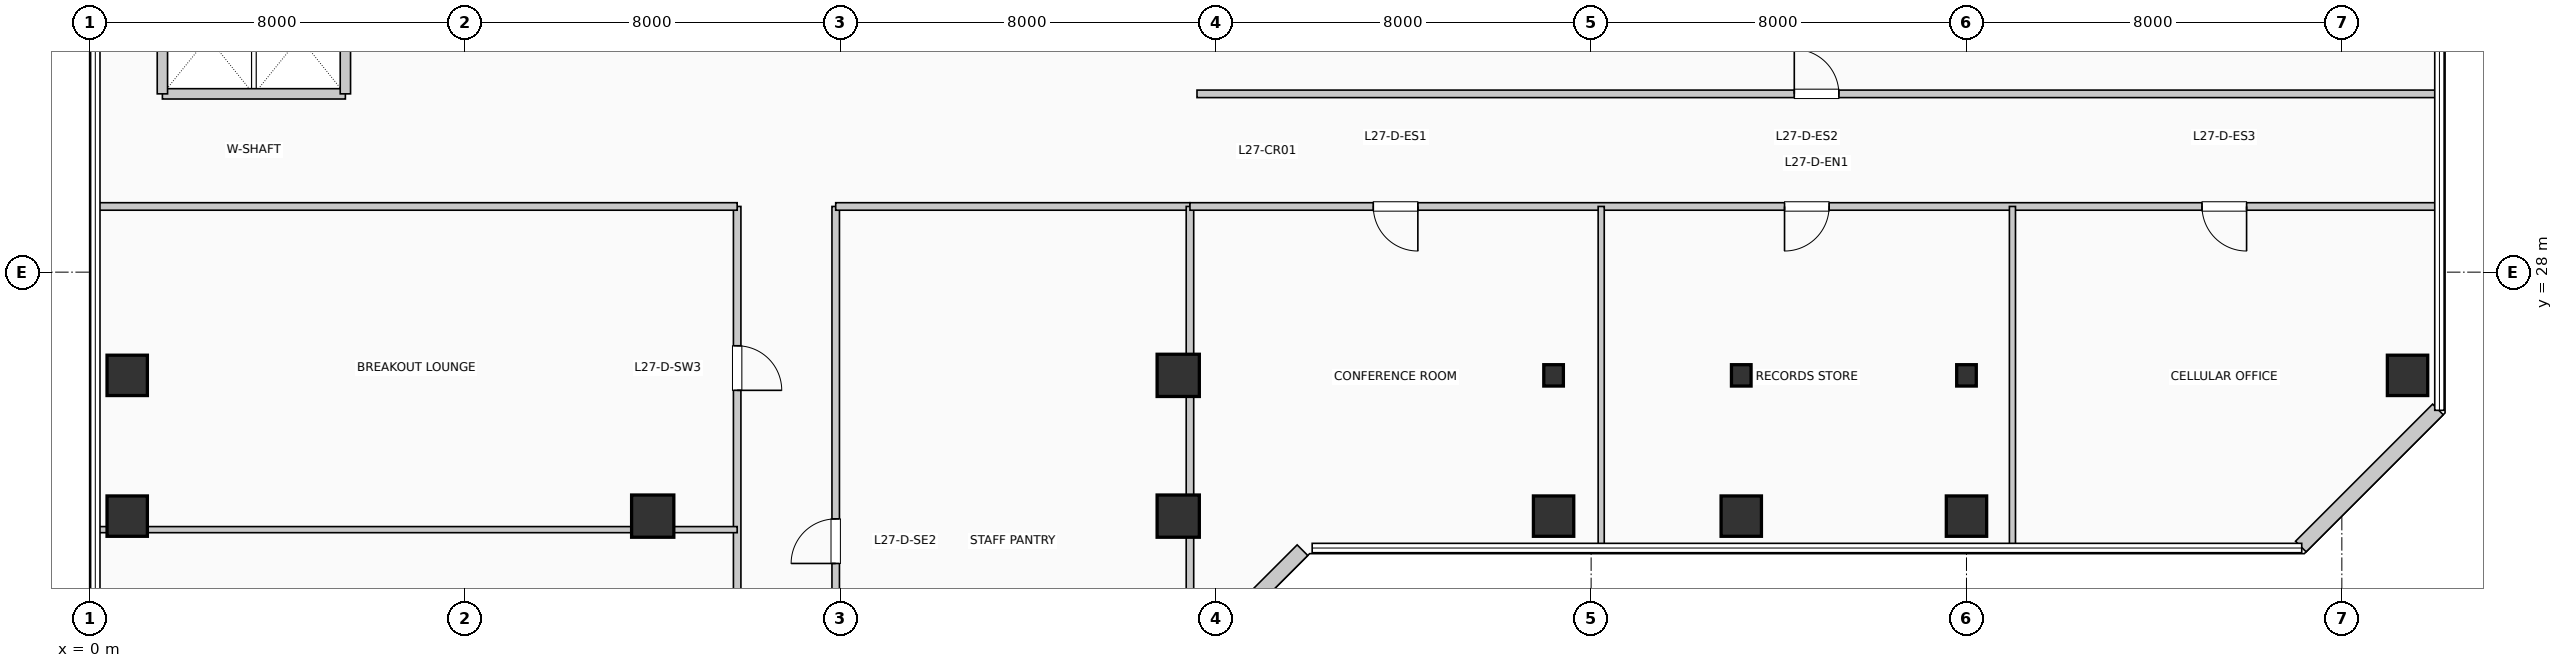
"""IFC4 building model, lengths in metres.
Left out: names, types, materials, properties, quantities, classifications, styles, units other than length and angle.
Written with IfcOpenShell. Run it as: python <this file> out.ifc"""

import sys

from ifc_helpers import new_model, si_unit, direction, frame, frame_2d, origin, origin_2d, place, context, subcontext, project, spatial, rectangle, i_section, extrude, element, fill, save


model = new_model("IFC4")
c1 = context("Model", 3, precision=1e-05, world=origin(), true_north=direction((0.0, 1.0)))
c2 = subcontext(c1, "Body", "Model", "MODEL_VIEW")
j1 = project(units=[si_unit("LENGTHUNIT", "METRE"), si_unit("PLANEANGLEUNIT", "RADIAN")], contexts=[c1])
p1 = place(None, origin())
s1 = spatial("IfcSite", under=j1, at=p1, CompositionType="ELEMENT")
p2 = place(p1, origin())
s2 = spatial("IfcBuilding", under=s1, at=p2, CompositionType="ELEMENT")
p3 = place(p2, frame((0.0, 0.0, 114.51)))
s3 = spatial("IfcBuildingStorey", under=s2, at=p3, CompositionType="ELEMENT", Elevation=114.51)
for number, where, z_axis, x_axis in (
    (1, (0.8, 22.8, 0.0), (0.0, 0.0, 1.0), (1.0, 0.0, 0.0)),
    (2, (0.8, 25.8, 0.0), (0.0, 0.0, 1.0), (1.0, 0.0, 0.0)),
):
    element("IfcColumn", number, at=place(p3, frame(where, z_axis=z_axis, x_axis=x_axis)), inside=s3, PredefinedType="COLUMN", context=c2, shape_type="SweptSolid", body=[
        extrude(rectangle(XDim=0.86, YDim=0.86, at=origin_2d()), origin(), (0.0, 0.0, 1.0), 3.96),
    ])
for number, where, z_axis, x_axis in (
    (3, (12.0, 22.8, 0.0), (0.0, 0.0, 1.0), (1.0, 0.0, 0.0)),
    (4, (23.2, 22.8, 0.0), (0.0, 0.0, 1.0), (1.0, 0.0, 0.0)),
    (5, (23.2, 25.8, 0.0), (0.0, 0.0, 1.0), (1.0, 0.0, 0.0)),
):
    element("IfcColumn", number, at=place(p3, frame(where, z_axis=z_axis, x_axis=x_axis)), inside=s3, PredefinedType="COLUMN", context=c2, shape_type="SweptSolid", body=[
        extrude(rectangle(XDim=0.9, YDim=0.9, at=origin_2d()), origin(), (0.0, 0.0, 1.0), 3.96),
    ])
p4 = place(p3, frame((31.2, 22.8, 0.0), z_axis=(0.0, 0.0, 1.0), x_axis=(1.0, 0.0, 0.0)))
e6 = element("IfcColumn", 6, at=p4, inside=s3, PredefinedType="COLUMN", context=c2, shape_type="SweptSolid", body=[
    extrude(rectangle(XDim=0.86, YDim=0.86, at=origin_2d()), origin(), (0.0, 0.0, 1.0), 3.96),
])
p5 = place(p3, frame((31.2, 25.8, 0.0), z_axis=(0.0, 0.0, 1.0), x_axis=(1.0, 0.0, 0.0)))
e7 = element("IfcColumn", 7, at=p5, inside=s3, PredefinedType="COLUMN", context=c2, shape_type="SweptSolid", body=[
    extrude(i_section(OverallWidth=0.418, OverallDepth=0.455, WebThickness=0.032, FlangeThickness=0.051, at=origin_2d()), origin(), (0.0, 0.0, 1.0), 3.96),
])
p6 = place(p3, frame((35.2, 22.8, 0.0), z_axis=(0.0, 0.0, 1.0), x_axis=(1.0, 0.0, 0.0)))
e8 = element("IfcColumn", 8, at=p6, inside=s3, PredefinedType="COLUMN", context=c2, shape_type="SweptSolid", body=[
    extrude(rectangle(XDim=0.86, YDim=0.86, at=origin_2d()), origin(), (0.0, 0.0, 1.0), 3.96),
])
p7 = place(p3, frame((35.2, 25.8, 0.0), z_axis=(0.0, 0.0, 1.0), x_axis=(1.0, 0.0, 0.0)))
e9 = element("IfcColumn", 9, at=p7, inside=s3, PredefinedType="COLUMN", context=c2, shape_type="SweptSolid", body=[
    extrude(i_section(OverallWidth=0.418, OverallDepth=0.455, WebThickness=0.032, FlangeThickness=0.051, at=origin_2d()), origin(), (0.0, 0.0, 1.0), 3.96),
])
p8 = place(p3, frame((40.0, 22.8, 0.0), z_axis=(0.0, 0.0, 1.0), x_axis=(1.0, 0.0, 0.0)))
e10 = element("IfcColumn", 10, at=p8, inside=s3, PredefinedType="COLUMN", context=c2, shape_type="SweptSolid", body=[
    extrude(rectangle(XDim=0.86, YDim=0.86, at=origin_2d()), origin(), (0.0, 0.0, 1.0), 3.96),
])
p9 = place(p3, frame((40.0, 25.8, 0.0), z_axis=(0.0, 0.0, 1.0), x_axis=(1.0, 0.0, 0.0)))
e11 = element("IfcColumn", 11, at=p9, inside=s3, PredefinedType="COLUMN", context=c2, shape_type="SweptSolid", body=[
    extrude(i_section(OverallWidth=0.418, OverallDepth=0.455, WebThickness=0.032, FlangeThickness=0.051, at=origin_2d()), origin(), (0.0, 0.0, 1.0), 3.96),
])
p10 = place(p3, frame((49.4, 25.8, 0.0), z_axis=(0.0, 0.0, 1.0), x_axis=(1.0, 0.0, 0.0)))
e12 = element("IfcColumn", 12, at=p10, inside=s3, PredefinedType="COLUMN", context=c2, shape_type="SweptSolid", body=[
    extrude(rectangle(XDim=0.86, YDim=0.86, at=origin_2d()), origin(), (0.0, 0.0, 1.0), 3.96),
])
p11 = place(p3, frame((23.926, 20.152, 0.0), z_axis=(0.0, 0.0, 1.0), x_axis=(0.707106781187, 0.707106781187, 0.0)))
e13 = element("IfcWall", 13, at=p11, inside=s3, PredefinedType="SOLIDWALL", context=c2, shape_type="SweptSolid", body=[
    extrude(rectangle(XDim=2.718, YDim=0.32, at=frame_2d((1.359, 0.0))), origin(), (0.0, 0.0, 1.0), 3.71),
])
p12 = place(p3, frame((47.126, 22.152, 0.0), z_axis=(0.0, 0.0, 1.0), x_axis=(0.707136318428, 0.707077242712, 0.0)))
e14 = element("IfcWall", 14, at=p12, inside=s3, PredefinedType="SOLIDWALL", context=c2, shape_type="SweptSolid", body=[
    extrude(rectangle(XDim=4.133, YDim=0.32, at=frame_2d((2.066, 0.0))), origin(), (0.0, 0.0, 1.0), 3.71),
])
p13 = place(p3, frame((1.55, 31.8, 0.0), z_axis=(0.0, 0.0, 1.0), x_axis=(1.0, 0.0, 0.0)))
e15 = element("IfcWall", 15, at=p13, inside=s3, PredefinedType="PARTITIONING", context=c2, shape_type="SweptSolid", body=[
    extrude(rectangle(XDim=3.9, YDim=0.22, at=frame_2d((1.95, 0.0))), origin(), (0.0, 0.0, 1.0), 3.71),
])
for number, where, z_axis, x_axis in (
    (16, (1.55, 31.8, 0.0), (0.0, 0.0, 1.0), (0.0, 1.0, 0.0)),
    (17, (5.45, 31.8, 0.0), (0.0, 0.0, 1.0), (0.0, 1.0, 0.0)),
):
    element("IfcWall", number, at=place(p3, frame(where, z_axis=z_axis, x_axis=x_axis)), inside=s3, PredefinedType="PARTITIONING", context=c2, shape_type="SweptSolid", body=[
        extrude(rectangle(XDim=2.38, YDim=0.22, at=frame_2d((1.19, 0.0))), origin(), (0.0, 0.0, 1.0), 3.71),
    ])
p14 = place(p3, frame((13.8, 4.8, 0.0), z_axis=(0.0, 0.0, 1.0), x_axis=(0.0, 1.0, 0.0)))
e18 = element("IfcWall", 18, at=p14, inside=s3, PredefinedType="PARTITIONING", context=c2, shape_type="SweptSolid", body=[
    extrude(rectangle(XDim=24.6, YDim=0.16, at=frame_2d((12.3, 0.0))), origin(), (0.0, 0.0, 1.0), 3.71),
])
p15 = place(p14, frame((5.149, 0.0, 0.0), z_axis=(0.0, 0.0, 1.0), x_axis=(-1.0, 0.0, 0.0)))
e19 = element("IfcOpeningElement", 19, at=p15, cuts=e18, PredefinedType="OPENING", context=c2, shape_type="SweptSolid", body=[
    extrude(rectangle(XDim=0.95, YDim=2.15, at=frame_2d((0.475, 1.075))), frame((0.0, 0.09, 0.0), z_axis=(0.0, -1.0, 0.0), x_axis=(1.0, 0.0, 0.0)), (0.0, 0.0, 1.0), 0.18),
])
p16 = place(p14, frame((14.005, 0.0, 0.0), z_axis=(0.0, 0.0, 1.0), x_axis=(-1.0, 0.0, 0.0)))
e20 = element("IfcOpeningElement", 20, at=p16, cuts=e18, PredefinedType="OPENING", context=c2, shape_type="SweptSolid", body=[
    extrude(rectangle(XDim=0.95, YDim=2.15, at=frame_2d((0.475, 1.075))), frame((0.0, 0.09, 0.0), z_axis=(0.0, -1.0, 0.0), x_axis=(1.0, 0.0, 0.0)), (0.0, 0.0, 1.0), 0.18),
])
p17 = place(p14, frame((21.631, 0.0, 0.0), z_axis=(0.0, 0.0, 1.0), x_axis=(-1.0, 0.0, 0.0)))
e21 = element("IfcOpeningElement", 21, at=p17, cuts=e18, PredefinedType="OPENING", context=c2, shape_type="SweptSolid", body=[
    extrude(rectangle(XDim=0.95, YDim=2.15, at=frame_2d((0.475, 1.075))), frame((0.0, 0.09, 0.0), z_axis=(0.0, -1.0, 0.0), x_axis=(1.0, 0.0, 0.0)), (0.0, 0.0, 1.0), 0.18),
])
p18 = place(p3, frame((15.9, 4.8, 0.0), z_axis=(0.0, 0.0, 1.0), x_axis=(0.0, 1.0, 0.0)))
e22 = element("IfcWall", 22, at=p18, inside=s3, PredefinedType="PARTITIONING", context=c2, shape_type="SweptSolid", body=[
    extrude(rectangle(XDim=24.6, YDim=0.16, at=frame_2d((12.3, 0.0))), origin(), (0.0, 0.0, 1.0), 3.71),
])
p19 = place(p18, frame((4.691, 0.0, 0.0)))
e23 = element("IfcOpeningElement", 23, at=p19, cuts=e22, PredefinedType="OPENING", context=c2, shape_type="SweptSolid", body=[
    extrude(rectangle(XDim=0.95, YDim=2.15, at=frame_2d((0.475, 1.075))), frame((0.0, 0.09, 0.0), z_axis=(0.0, -1.0, 0.0), x_axis=(1.0, 0.0, 0.0)), (0.0, 0.0, 1.0), 0.18),
])
p20 = place(p18, frame((16.991, 0.0, 0.0)))
e24 = element("IfcOpeningElement", 24, at=p20, cuts=e22, PredefinedType="OPENING", context=c2, shape_type="SweptSolid", body=[
    extrude(rectangle(XDim=0.95, YDim=2.15, at=frame_2d((0.475, 1.075))), frame((0.0, 0.09, 0.0), z_axis=(0.0, -1.0, 0.0), x_axis=(1.0, 0.0, 0.0)), (0.0, 0.0, 1.0), 0.18),
])
p21 = place(p3, frame((0.19, 29.4, 0.0), z_axis=(0.0, 0.0, 1.0), x_axis=(1.0, 0.0, 0.0)))
e25 = element("IfcWall", 25, at=p21, inside=s3, PredefinedType="PARTITIONING", context=c2, shape_type="SweptSolid", body=[
    extrude(rectangle(XDim=13.61, YDim=0.16, at=frame_2d((6.805, 0.0))), origin(), (0.0, 0.0, 1.0), 3.365),
])
p22 = place(p3, frame((15.9, 29.4, 0.0), z_axis=(0.0, 0.0, 1.0), x_axis=(1.0, 0.0, 0.0)))
e26 = element("IfcWall", 26, at=p22, inside=s3, PredefinedType="PARTITIONING", context=c2, shape_type="SweptSolid", body=[
    extrude(rectangle(XDim=7.55, YDim=0.16, at=frame_2d((3.775, 0.0))), origin(), (0.0, 0.0, 1.0), 3.71),
])
p23 = place(p3, frame((23.45, 0.19, 0.0), z_axis=(0.0, 0.0, 1.0), x_axis=(0.0, 1.0, 0.0)))
e27 = element("IfcWall", 27, at=p23, inside=s3, PredefinedType="PARTITIONING", context=c2, shape_type="SweptSolid", body=[
    extrude(rectangle(XDim=29.21, YDim=0.16, at=frame_2d((14.605, 0.0))), origin(), (0.0, 0.0, 1.0), 3.045),
])
p24 = place(p3, frame((0.19, 22.512, 0.0), z_axis=(0.0, 0.0, 1.0), x_axis=(1.0, 0.0, 0.0)))
e28 = element("IfcWall", 28, at=p24, inside=s3, PredefinedType="PARTITIONING", context=c2, shape_type="SweptSolid", body=[
    extrude(rectangle(XDim=13.61, YDim=0.13, at=frame_2d((6.805, 0.0))), origin(), (0.0, 0.0, 1.0), 3.045),
])
p25 = place(p3, frame((23.45, 29.4, 0.0), z_axis=(0.0, 0.0, 1.0), x_axis=(1.0, 0.0, 0.0)))
e29 = element("IfcWall", 29, at=p25, inside=s3, PredefinedType="PARTITIONING", context=c2, shape_type="SweptSolid", body=[
    extrude(rectangle(XDim=26.56, YDim=0.16, at=frame_2d((13.28, 0.0))), origin(), (0.0, 0.0, 1.0), 3.365),
])
p26 = place(p25, frame((4.857, 0.0, 0.0), z_axis=(0.0, 0.0, 1.0), x_axis=(-1.0, 0.0, 0.0)))
e30 = element("IfcOpeningElement", 30, at=p26, cuts=e29, PredefinedType="OPENING", context=c2, shape_type="SweptSolid", body=[
    extrude(rectangle(XDim=0.95, YDim=2.15, at=frame_2d((0.475, 1.075))), frame((0.0, 0.09, 0.0), z_axis=(0.0, -1.0, 0.0), x_axis=(1.0, 0.0, 0.0)), (0.0, 0.0, 1.0), 0.18),
])
p27 = place(p25, frame((13.622, 0.0, 0.0), z_axis=(0.0, 0.0, 1.0), x_axis=(-1.0, 0.0, 0.0)))
e31 = element("IfcOpeningElement", 31, at=p27, cuts=e29, PredefinedType="OPENING", context=c2, shape_type="SweptSolid", body=[
    extrude(rectangle(XDim=0.95, YDim=2.15, at=frame_2d((0.475, 1.075))), frame((0.0, 0.09, 0.0), z_axis=(0.0, -1.0, 0.0), x_axis=(1.0, 0.0, 0.0)), (0.0, 0.0, 1.0), 0.18),
])
p28 = place(p25, frame((22.52, 0.0, 0.0), z_axis=(0.0, 0.0, 1.0), x_axis=(-1.0, 0.0, 0.0)))
e32 = element("IfcOpeningElement", 32, at=p28, cuts=e29, PredefinedType="OPENING", context=c2, shape_type="SweptSolid", body=[
    extrude(rectangle(XDim=0.95, YDim=2.15, at=frame_2d((0.475, 1.075))), frame((0.0, 0.09, 0.0), z_axis=(0.0, -1.0, 0.0), x_axis=(1.0, 0.0, 0.0)), (0.0, 0.0, 1.0), 0.18),
])
p29 = place(p3, frame((23.6, 31.8, 0.0), z_axis=(0.0, 0.0, 1.0), x_axis=(1.0, 0.0, 0.0)))
e33 = element("IfcWall", 33, at=p29, inside=s3, PredefinedType="PARTITIONING", context=c2, shape_type="SweptSolid", body=[
    extrude(rectangle(XDim=26.41, YDim=0.16, at=frame_2d((13.205, 0.0))), origin(), (0.0, 0.0, 1.0), 3.71),
])
p30 = place(p29, frame((12.73, 0.0, 0.0)))
e34 = element("IfcOpeningElement", 34, at=p30, cuts=e33, PredefinedType="OPENING", context=c2, shape_type="SweptSolid", body=[
    extrude(rectangle(XDim=0.95, YDim=2.15, at=frame_2d((0.475, 1.075))), frame((0.0, 0.09, 0.0), z_axis=(0.0, -1.0, 0.0), x_axis=(1.0, 0.0, 0.0)), (0.0, 0.0, 1.0), 0.18),
])
for number, where, z_axis, x_axis in (
    (35, (32.215, 22.19, 0.0), (0.0, 0.0, 1.0), (0.0, 1.0, 0.0)),
    (36, (40.979, 22.19, 0.0), (0.0, 0.0, 1.0), (0.0, 1.0, 0.0)),
):
    element("IfcWall", number, at=place(p3, frame(where, z_axis=z_axis, x_axis=x_axis)), inside=s3, PredefinedType="PARTITIONING", context=c2, shape_type="SweptSolid", body=[
        extrude(rectangle(XDim=7.21, YDim=0.13, at=frame_2d((3.605, 0.0))), origin(), (0.0, 0.0, 1.0), 3.71),
    ])
p31 = place(p17, origin())
e37 = element("IfcDoor", 37, at=p31, inside=s3, OperationType="SINGLE_SWING_LEFT", PredefinedType="DOOR", context=c2, shape_type="SweptSolid", body=[
    extrude(rectangle(XDim=0.95, YDim=2.15, at=frame_2d((0.475, 1.075))), frame((0.0, 0.025, 0.0), z_axis=(0.0, -1.0, 0.0), x_axis=(1.0, 0.0, 0.0)), (0.0, 0.0, 1.0), 0.05),
])
fill(e21, e37)
p32 = place(p20, origin())
e38 = element("IfcDoor", 38, at=p32, inside=s3, OperationType="SINGLE_SWING_LEFT", PredefinedType="DOOR", context=c2, shape_type="SweptSolid", body=[
    extrude(rectangle(XDim=0.95, YDim=2.15, at=frame_2d((0.475, 1.075))), frame((0.0, 0.025, 0.0), z_axis=(0.0, -1.0, 0.0), x_axis=(1.0, 0.0, 0.0)), (0.0, 0.0, 1.0), 0.05),
])
fill(e24, e38)
p33 = place(p26, origin())
e39 = element("IfcDoor", 39, at=p33, inside=s3, OperationType="SINGLE_SWING_RIGHT", PredefinedType="DOOR", context=c2, shape_type="SweptSolid", body=[
    extrude(rectangle(XDim=0.95, YDim=2.15, at=frame_2d((0.475, 1.075))), frame((0.0, 0.025, 0.0), z_axis=(0.0, -1.0, 0.0), x_axis=(1.0, 0.0, 0.0)), (0.0, 0.0, 1.0), 0.05),
])
fill(e30, e39)
p34 = place(p27, origin())
e40 = element("IfcDoor", 40, at=p34, inside=s3, OperationType="SINGLE_SWING_LEFT", PredefinedType="DOOR", context=c2, shape_type="SweptSolid", body=[
    extrude(rectangle(XDim=0.95, YDim=2.15, at=frame_2d((0.475, 1.075))), frame((0.0, 0.025, 0.0), z_axis=(0.0, -1.0, 0.0), x_axis=(1.0, 0.0, 0.0)), (0.0, 0.0, 1.0), 0.05),
])
fill(e31, e40)
p35 = place(p28, origin())
e41 = element("IfcDoor", 41, at=p35, inside=s3, OperationType="SINGLE_SWING_RIGHT", PredefinedType="DOOR", context=c2, shape_type="SweptSolid", body=[
    extrude(rectangle(XDim=0.95, YDim=2.15, at=frame_2d((0.475, 1.075))), frame((0.0, 0.025, 0.0), z_axis=(0.0, -1.0, 0.0), x_axis=(1.0, 0.0, 0.0)), (0.0, 0.0, 1.0), 0.05),
])
fill(e32, e41)
p36 = place(p30, origin())
e42 = element("IfcDoor", 42, at=p36, inside=s3, OperationType="SINGLE_SWING_LEFT", PredefinedType="DOOR", context=c2, shape_type="SweptSolid", body=[
    extrude(rectangle(XDim=0.95, YDim=2.15, at=frame_2d((0.475, 1.075))), frame((0.0, 0.025, 0.0), z_axis=(0.0, -1.0, 0.0), x_axis=(1.0, 0.0, 0.0)), (0.0, 0.0, 1.0), 0.05),
])
fill(e34, e42)
save(model, sys.argv[1])
